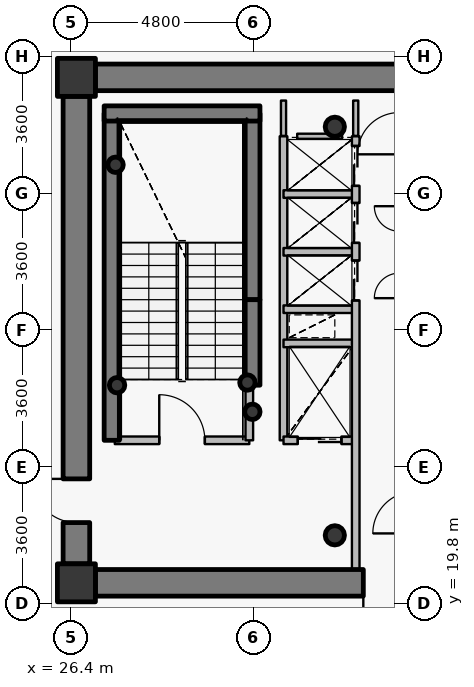
"""IFC4 building model, lengths in metres.
Left out: names, types, materials, properties, quantities, classifications, styles, units other than length and angle.
Written with IfcOpenShell. Run it as: python <this file> out.ifc"""

import sys

from ifc_helpers import new_model, si_unit, direction, frame, frame_2d, origin, origin_2d, place, context, subcontext, project, spatial, rectangle, hollow_circle, extrude, source, transform, mapped, element, fill, save


model = new_model("IFC4")
c1 = context("Model", 3, precision=1e-05, world=origin(), true_north=direction((0.0, 1.0)))
c2 = subcontext(c1, "Body", "Model", "MODEL_VIEW")
j1 = project(units=[si_unit("LENGTHUNIT", "METRE"), si_unit("PLANEANGLEUNIT", "RADIAN")], contexts=[c1])
p1 = place(None, origin())
s1 = spatial("IfcSite", under=j1, at=p1, CompositionType="ELEMENT")
p2 = place(p1, origin())
s2 = spatial("IfcBuilding", under=s1, at=p2, CompositionType="ELEMENT")
p3 = place(p2, frame((0.0, 0.0, 244.05)))
s3 = spatial("IfcBuildingStorey", under=s2, at=p3, CompositionType="ELEMENT", Elevation=244.05)
for number, where, z_axis, x_axis in (
    (1, (26.55, 20.35, 0.0), (0.0, 0.0, 1.0), (1.0, 0.0, 0.0)),
    (2, (26.55, 33.65, 0.0), (0.0, 0.0, 1.0), (1.0, 0.0, 0.0)),
):
    element("IfcColumn", number, at=place(p3, frame(where, z_axis=z_axis, x_axis=x_axis)), inside=s3, PredefinedType="COLUMN", context=c2, shape_type="SweptSolid", body=[
        extrude(rectangle(XDim=1.0, YDim=1.0, at=origin_2d()), origin(), (0.0, 0.0, 1.0), 3.75),
    ])
for number, where, z_axis, x_axis in (
    (3, (33.35, 21.6, 0.0), (0.0, 0.0, 1.0), (1.0, 0.0, 0.0)),
    (4, (33.35, 32.35, 0.0), (0.0, 0.0, 1.0), (1.0, 0.0, 0.0)),
):
    element("IfcColumn", number, at=place(p3, frame(where, z_axis=z_axis, x_axis=x_axis)), inside=s3, PredefinedType="COLUMN", context=c2, shape_type="SweptSolid", body=[
        extrude(hollow_circle(Radius=0.254, WallThickness=0.02, at=origin_2d()), origin(), (0.0, 0.0, 1.0), 3.75),
    ])
p4 = place(p3, frame((27.48, 24.1, 0.0), z_axis=(0.0, 0.0, 1.0), x_axis=(0.0, 1.0, 0.0)))
e5 = element("IfcWall", 5, at=p4, inside=s3, PredefinedType="SHEAR", context=c2, shape_type="SweptSolid", body=[
    extrude(rectangle(XDim=8.6, YDim=0.4, at=frame_2d((4.3, 0.0))), origin(), (0.0, 0.0, 1.0), 3.75),
])
p5 = place(p3, frame((31.18, 27.8, 0.0), z_axis=(0.0, 0.0, 1.0), x_axis=(0.0, 1.0, 0.0)))
e6 = element("IfcWall", 6, at=p5, inside=s3, PredefinedType="SHEAR", context=c2, shape_type="SweptSolid", body=[
    extrude(rectangle(XDim=4.9, YDim=0.4, at=frame_2d((2.45, 0.0))), origin(), (0.0, 0.0, 1.0), 3.75),
])
p6 = place(p3, frame((27.28, 32.7, 0.0), z_axis=(0.0, 0.0, 1.0), x_axis=(1.0, 0.0, 0.0)))
e7 = element("IfcWall", 7, at=p6, inside=s3, PredefinedType="SHEAR", context=c2, shape_type="SweptSolid", body=[
    extrude(rectangle(XDim=4.1, YDim=0.4, at=frame_2d((2.05, 0.0))), origin(), (0.0, 0.0, 1.0), 3.75),
])
for number, where, z_axis, x_axis in (
    (8, (27.58, 31.35, 0.0), (0.0, 0.0, 1.0), (1.0, 0.0, 0.0)),
    (9, (31.05, 25.62, 0.0), (0.0, 0.0, 1.0), (1.0, 0.0, 0.0)),
    (10, (31.18, 24.85, 0.0), (0.0, 0.0, 1.0), (1.0, 0.0, 0.0)),
    (11, (27.62, 25.55, 0.0), (0.0, 0.0, 1.0), (1.0, 0.0, 0.0)),
):
    element("IfcColumn", number, at=place(p3, frame(where, z_axis=z_axis, x_axis=x_axis)), inside=s3, PredefinedType="COLUMN", context=c2, shape_type="SweptSolid", body=[
        extrude(hollow_circle(Radius=0.203, WallThickness=0.016, at=origin_2d()), origin(), (0.0, 0.0, 1.0), 3.75),
    ])
p7 = place(p3, frame((27.05, 33.65, 0.0), z_axis=(0.0, 0.0, 1.0), x_axis=(1.0, 0.0, 0.0)))
e12 = element("IfcWall", 12, at=p7, inside=s3, PredefinedType="SHEAR", context=c2, shape_type="SweptSolid", body=[
    extrude(rectangle(XDim=17.9, YDim=0.7, at=frame_2d((8.95, 0.0))), origin(), (0.0, 0.0, 1.0), 3.05),
])
p8 = place(p7, frame((13.675, 0.0, 0.0)))
e13 = element("IfcOpeningElement", 13, at=p8, cuts=e12, PredefinedType="OPENING", context=c2, shape_type="SweptSolid", body=[
    extrude(rectangle(XDim=1.15, YDim=2.15, at=origin_2d()), frame((0.575, 0.36, 1.075), z_axis=(0.0, -1.0, 0.0), x_axis=(1.0, 0.0, 0.0)), (0.0, 0.0, 1.0), 0.72),
])
p9 = place(p3, frame((44.95, 20.35, 0.0), z_axis=(0.0, 0.0, 1.0), x_axis=(-1.0, 0.0, 0.0)))
e14 = element("IfcWall", 14, at=p9, inside=s3, PredefinedType="SHEAR", context=c2, shape_type="SweptSolid", body=[
    extrude(rectangle(XDim=17.9, YDim=0.7, at=frame_2d((8.95, 0.0))), origin(), (0.0, 0.0, 1.0), 3.05),
])
p10 = place(p9, frame((9.7, 0.0, 0.0)))
e15 = element("IfcOpeningElement", 15, at=p10, cuts=e14, PredefinedType="OPENING", context=c2, shape_type="SweptSolid", body=[
    extrude(rectangle(XDim=1.15, YDim=2.15, at=origin_2d()), frame((0.575, 0.36, 1.075), z_axis=(0.0, -1.0, 0.0), x_axis=(1.0, 0.0, 0.0)), (0.0, 0.0, 1.0), 0.72),
])
p11 = place(p3, frame((26.55, 20.85, 0.0), z_axis=(0.0, 0.0, 1.0), x_axis=(0.0, 1.0, 0.0)))
e16 = element("IfcWall", 16, at=p11, inside=s3, PredefinedType="SHEAR", context=c2, shape_type="SweptSolid", body=[
    extrude(rectangle(XDim=12.3, YDim=0.7, at=frame_2d((6.15, 0.0))), origin(), (0.0, 0.0, 1.0), 3.05),
])
p12 = place(p11, frame((1.085, 0.0, 0.0)))
e17 = element("IfcOpeningElement", 17, at=p12, cuts=e16, PredefinedType="OPENING", context=c2, shape_type="SweptSolid", body=[
    extrude(rectangle(XDim=1.15, YDim=2.15, at=origin_2d()), frame((0.575, 0.36, 1.075), z_axis=(0.0, -1.0, 0.0), x_axis=(1.0, 0.0, 0.0)), (0.0, 0.0, 1.0), 0.72),
])
p13 = place(p3, frame((31.18, 25.55, 0.0), z_axis=(0.0, 0.0, 1.0), x_axis=(0.0, 1.0, 0.0)))
e18 = element("IfcWall", 18, at=p13, inside=s3, PredefinedType="SHEAR", context=c2, shape_type="SweptSolid", body=[
    extrude(rectangle(XDim=2.25, YDim=0.4, at=frame_2d((1.125, 0.0))), origin(), (0.0, 0.0, 1.0), 3.1),
])
p14 = place(p3, frame((27.56, 24.1, 0.0), z_axis=(0.0, 0.0, 1.0), x_axis=(1.0, 0.0, 0.0)))
e19 = element("IfcWall", 19, at=p14, inside=s3, PredefinedType="PARTITIONING", context=c2, shape_type="SweptSolid", body=[
    extrude(rectangle(XDim=3.54, YDim=0.2, at=frame_2d((1.77, 0.0))), origin(), (0.0, 0.0, 1.0), 3.5),
])
p15 = place(p14, frame((1.17, 0.0, 0.0)))
e20 = element("IfcOpeningElement", 20, at=p15, cuts=e19, PredefinedType="OPENING", context=c2, shape_type="SweptSolid", body=[
    extrude(rectangle(XDim=1.2, YDim=2.15, at=origin_2d()), frame((0.6, 0.11, 1.075), z_axis=(0.0, -1.0, 0.0), x_axis=(1.0, 0.0, 0.0)), (0.0, 0.0, 1.0), 0.22),
])
p16 = place(p3, frame((31.1, 24.1, 0.0), z_axis=(0.0, 0.0, 1.0), x_axis=(0.0, 1.0, 0.0)))
e21 = element("IfcWall", 21, at=p16, inside=s3, PredefinedType="PARTITIONING", context=c2, shape_type="SweptSolid", body=[
    extrude(rectangle(XDim=1.44, YDim=0.2, at=frame_2d((0.72, 0.0))), origin(), (0.0, 0.0, 1.0), 3.5),
])
p17 = place(p3, frame((32.0, 24.1, 0.0), z_axis=(0.0, 0.0, 1.0), x_axis=(0.0, 1.0, 0.0)))
e22 = element("IfcWall", 22, at=p17, inside=s3, PredefinedType="PARTITIONING", context=c2, shape_type="SweptSolid", body=[
    extrude(rectangle(XDim=8.0, YDim=0.2, at=frame_2d((4.0, 0.0))), origin(), (0.0, 0.0, 1.0), 3.5),
])
p18 = place(p3, frame((32.0, 24.1, 0.0), z_axis=(0.0, 0.0, 1.0), x_axis=(1.0, 0.0, 0.0)))
e23 = element("IfcWall", 23, at=p18, inside=s3, PredefinedType="PARTITIONING", context=c2, shape_type="SweptSolid", body=[
    extrude(rectangle(XDim=1.9, YDim=0.2, at=frame_2d((0.95, 0.0))), origin(), (0.0, 0.0, 1.0), 3.085),
])
p19 = place(p18, frame((0.375, 0.0, 0.0)))
e24 = element("IfcOpeningElement", 24, at=p19, cuts=e23, PredefinedType="OPENING", context=c2, shape_type="SweptSolid", body=[
    extrude(rectangle(XDim=1.15, YDim=2.15, at=origin_2d()), frame((0.575, 0.11, 1.075), z_axis=(0.0, -1.0, 0.0), x_axis=(1.0, 0.0, 0.0)), (0.0, 0.0, 1.0), 0.22),
])
for number, where, z_axis, x_axis in (
    (25, (32.0, 26.65, 0.0), (0.0, 0.0, 1.0), (1.0, 0.0, 0.0)),
    (26, (32.0, 27.55, 0.0), (0.0, 0.0, 1.0), (1.0, 0.0, 0.0)),
    (27, (32.0, 29.06, 0.0), (0.0, 0.0, 1.0), (1.0, 0.0, 0.0)),
    (28, (32.0, 30.58, 0.0), (0.0, 0.0, 1.0), (1.0, 0.0, 0.0)),
):
    element("IfcWall", number, at=place(p3, frame(where, z_axis=z_axis, x_axis=x_axis)), inside=s3, PredefinedType="PARTITIONING", context=c2, shape_type="SweptSolid", body=[
        extrude(rectangle(XDim=1.9, YDim=0.2, at=frame_2d((0.95, 0.0))), origin(), (0.0, 0.0, 1.0), 3.085),
    ])
p20 = place(p3, frame((33.9, 20.7, 0.0), z_axis=(0.0, 0.0, 1.0), x_axis=(0.0, 1.0, 0.0)))
e29 = element("IfcWall", 29, at=p20, inside=s3, PredefinedType="PARTITIONING", context=c2, shape_type="SweptSolid", body=[
    extrude(rectangle(XDim=11.4, YDim=0.2, at=frame_2d((5.7, 0.0))), origin(), (0.0, 0.0, 1.0), 3.085),
])
p21 = place(p20, frame((7.08, 0.0, 0.0)))
e30 = element("IfcOpeningElement", 30, at=p21, cuts=e29, PredefinedType="OPENING", context=c2, shape_type="SweptSolid", body=[
    extrude(rectangle(XDim=1.05, YDim=2.15, at=origin_2d()), frame((0.525, 0.11, 1.075), z_axis=(0.0, -1.0, 0.0), x_axis=(1.0, 0.0, 0.0)), (0.0, 0.0, 1.0), 0.22),
])
p22 = place(p20, frame((8.595, 0.0, 0.0)))
e31 = element("IfcOpeningElement", 31, at=p22, cuts=e29, PredefinedType="OPENING", context=c2, shape_type="SweptSolid", body=[
    extrude(rectangle(XDim=1.05, YDim=2.15, at=origin_2d()), frame((0.525, 0.11, 1.075), z_axis=(0.0, -1.0, 0.0), x_axis=(1.0, 0.0, 0.0)), (0.0, 0.0, 1.0), 0.22),
])
p23 = place(p20, frame((10.095, 0.0, 0.0)))
e32 = element("IfcOpeningElement", 32, at=p23, cuts=e29, PredefinedType="OPENING", context=c2, shape_type="SweptSolid", body=[
    extrude(rectangle(XDim=1.05, YDim=2.15, at=origin_2d()), frame((0.525, 0.11, 1.075), z_axis=(0.0, -1.0, 0.0), x_axis=(1.0, 0.0, 0.0)), (0.0, 0.0, 1.0), 0.22),
])
p24 = place(p3, frame((32.36, 32.1, 0.0), z_axis=(0.0, 0.0, 1.0), x_axis=(1.0, 0.0, 0.0)))
e33 = element("IfcWall", 33, at=p24, inside=s3, PredefinedType="PARTITIONING", context=c2, shape_type="SweptSolid", body=[
    extrude(rectangle(XDim=1.18, YDim=0.135, at=frame_2d((0.59, 0.0))), origin(), (0.0, 0.0, 1.0), 3.085),
])
p25 = place(p3, frame((32.0, 33.04, 0.0), z_axis=(0.0, 0.0, 1.0), x_axis=(0.0, -1.0, 0.0)))
e34 = element("IfcWall", 34, at=p25, inside=s3, PredefinedType="PARTITIONING", context=c2, shape_type="SweptSolid", body=[
    extrude(rectangle(XDim=0.93, YDim=0.135, at=frame_2d((0.465, 0.0))), origin(), (0.0, 0.0, 1.0), 3.035),
])
p26 = place(p3, frame((33.9, 32.11, 0.0), z_axis=(0.0, 0.0, 1.0), x_axis=(0.0, 1.0, 0.0)))
e35 = element("IfcWall", 35, at=p26, inside=s3, PredefinedType="PARTITIONING", context=c2, shape_type="SweptSolid", body=[
    extrude(rectangle(XDim=0.93, YDim=0.135, at=frame_2d((0.465, 0.0))), origin(), (0.0, 0.0, 1.0), 3.085),
])
p27 = place(p3, frame((27.04, 34.0, 0.0), z_axis=(0.0, 0.0, 1.0), x_axis=(-1.0, 0.0, 0.0)))
e36 = element("IfcWall", 36, at=p27, inside=s3, PredefinedType="PARTITIONING", context=c2, shape_type="SweptSolid", body=[
    extrude(rectangle(XDim=0.84, YDim=0.135, at=frame_2d((0.42, 0.0))), origin(), (0.0, 0.0, 1.0), 2.935),
])
p28 = place(p3, frame((26.2, 33.692, 0.0), z_axis=(0.0, 0.0, 1.0), x_axis=(0.0, -1.0, 0.0)))
e37 = element("IfcWall", 37, at=p28, inside=s3, PredefinedType="PARTITIONING", context=c2, shape_type="SweptSolid", body=[
    extrude(rectangle(XDim=0.532, YDim=0.135, at=frame_2d((0.266, 0.0))), origin(), (0.0, 0.0, 1.0), 3.5),
])
p29 = place(p3, frame((26.2, 20.84, 0.0), z_axis=(0.0, 0.0, 1.0), x_axis=(0.0, -1.0, 0.0)))
e38 = element("IfcWall", 38, at=p29, inside=s3, PredefinedType="PARTITIONING", context=c2, shape_type="SweptSolid", body=[
    extrude(rectangle(XDim=0.84, YDim=0.135, at=frame_2d((0.42, 0.0))), origin(), (0.0, 0.0, 1.0), 3.185),
])
p30 = place(p3, frame((26.508, 20.0, 0.0), z_axis=(0.0, 0.0, 1.0), x_axis=(1.0, 0.0, 0.0)))
e39 = element("IfcWall", 39, at=p30, inside=s3, PredefinedType="PARTITIONING", context=c2, shape_type="SweptSolid", body=[
    extrude(rectangle(XDim=0.532, YDim=0.135, at=frame_2d((0.266, 0.0))), origin(), (0.0, 0.0, 1.0), 2.935),
])
m1 = source(origin(), c2, "Body", "SweptSolid", [
    extrude(rectangle(XDim=1.15, YDim=2.15, at=origin_2d()), frame((0.575, 0.025, 1.075), z_axis=(0.0, -1.0, 0.0), x_axis=(1.0, 0.0, 0.0)), (0.0, 0.0, 1.0), 0.05),
])
p31 = place(p12, origin())
e40 = element("IfcDoor", 40, at=p31, inside=s3, OperationType="SINGLE_SWING_RIGHT", PredefinedType="DOOR", context=c2, shape_type="MappedRepresentation", body=[
    mapped(m1, transform((0.0, 0.0, 0.0), x_axis=(1.0, 0.0, 0.0), y_axis=(0.0, 1.0, 0.0), z_axis=(0.0, 0.0, 1.0), scale=1.0)),
])
fill(e17, e40)
p32 = place(p10, origin())
e41 = element("IfcDoor", 41, at=p32, inside=s3, OperationType="SINGLE_SWING_RIGHT", PredefinedType="DOOR", context=c2, shape_type="MappedRepresentation", body=[
    mapped(m1, transform((0.0, 0.0, 0.0), x_axis=(1.0, 0.0, 0.0), y_axis=(0.0, 1.0, 0.0), z_axis=(0.0, 0.0, 1.0), scale=1.0)),
])
fill(e15, e41)
m2 = source(origin(), c2, "Body", "SweptSolid", [
    extrude(rectangle(XDim=1.2, YDim=2.15, at=origin_2d()), frame((0.6, 0.025, 1.075), z_axis=(0.0, -1.0, 0.0), x_axis=(1.0, 0.0, 0.0)), (0.0, 0.0, 1.0), 0.05),
])
p33 = place(p15, origin())
e42 = element("IfcDoor", 42, at=p33, inside=s3, OperationType="SINGLE_SWING_LEFT", PredefinedType="DOOR", context=c2, shape_type="MappedRepresentation", body=[
    mapped(m2, transform((0.0, 0.0, 0.0), x_axis=(1.0, 0.0, 0.0), y_axis=(0.0, 1.0, 0.0), z_axis=(0.0, 0.0, 1.0), scale=1.0)),
])
fill(e20, e42)
m3 = source(origin(), c2, "Body", "SweptSolid", [
    extrude(rectangle(XDim=1.15, YDim=2.15, at=origin_2d()), frame((0.575, 0.025, 1.075), z_axis=(0.0, -1.0, 0.0), x_axis=(1.0, 0.0, 0.0)), (0.0, 0.0, 1.0), 0.05),
])
p34 = place(p19, origin())
e43 = element("IfcDoor", 43, at=p34, inside=s3, OperationType="DOUBLE_DOOR_SLIDING", PredefinedType="USERDEFINED", context=c2, shape_type="MappedRepresentation", body=[
    mapped(m3, transform((0.0, 0.0, 0.0), x_axis=(1.0, 0.0, 0.0), y_axis=(0.0, 1.0, 0.0), z_axis=(0.0, 0.0, 1.0), scale=1.0)),
])
fill(e24, e43)
m4 = source(origin(), c2, "Body", "SweptSolid", [
    extrude(rectangle(XDim=1.05, YDim=2.15, at=origin_2d()), frame((0.525, 0.025, 1.075), z_axis=(0.0, -1.0, 0.0), x_axis=(1.0, 0.0, 0.0)), (0.0, 0.0, 1.0), 0.05),
])
p35 = place(p21, origin())
e44 = element("IfcDoor", 44, at=p35, inside=s3, OperationType="DOUBLE_DOOR_SLIDING", PredefinedType="USERDEFINED", context=c2, shape_type="MappedRepresentation", body=[
    mapped(m4, transform((0.0, 0.0, 0.0), x_axis=(1.0, 0.0, 0.0), y_axis=(0.0, 1.0, 0.0), z_axis=(0.0, 0.0, 1.0), scale=1.0)),
])
fill(e30, e44)
p36 = place(p22, origin())
e45 = element("IfcDoor", 45, at=p36, inside=s3, OperationType="DOUBLE_DOOR_SLIDING", PredefinedType="USERDEFINED", context=c2, shape_type="MappedRepresentation", body=[
    mapped(m4, transform((0.0, 0.0, 0.0), x_axis=(1.0, 0.0, 0.0), y_axis=(0.0, 1.0, 0.0), z_axis=(0.0, 0.0, 1.0), scale=1.0)),
])
fill(e31, e45)
p37 = place(p23, origin())
e46 = element("IfcDoor", 46, at=p37, inside=s3, OperationType="DOUBLE_DOOR_SLIDING", PredefinedType="USERDEFINED", context=c2, shape_type="MappedRepresentation", body=[
    mapped(m4, transform((0.0, 0.0, 0.0), x_axis=(1.0, 0.0, 0.0), y_axis=(0.0, 1.0, 0.0), z_axis=(0.0, 0.0, 1.0), scale=1.0)),
])
fill(e32, e46)
save(model, sys.argv[1])
